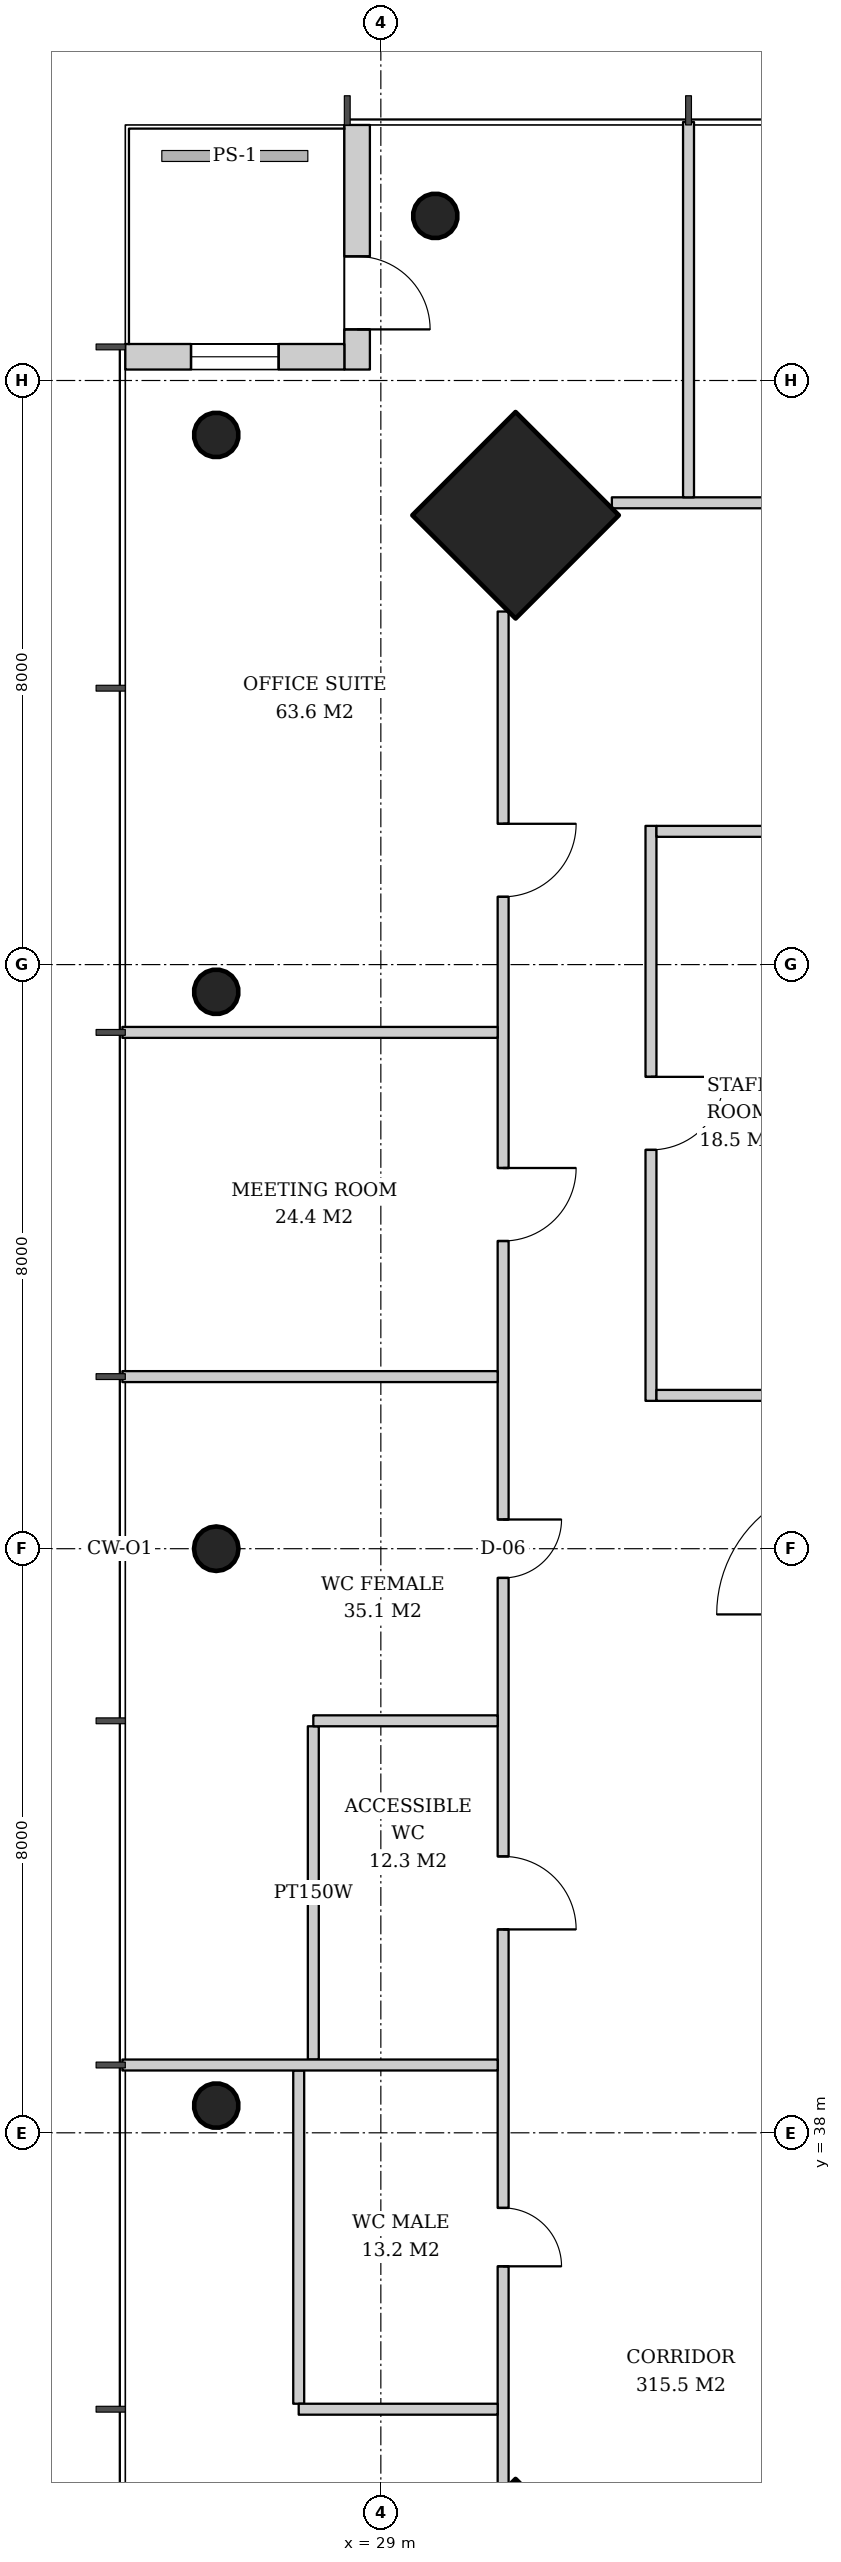
"""IFC4 building model, lengths in metres.
Left out: names, types, materials, properties, quantities, classifications, styles, units other than length and angle.
Written with IfcOpenShell. Run it as: python <this file> out.ifc"""

import sys

from ifc_helpers import new_model, si_unit, direction, frame, frame_2d, origin, origin_2d, place, context, subcontext, project, spatial, rectangle, hollow_circle, extrude, element, fill, save


model = new_model("IFC4")
c1 = context("Model", 3, precision=1e-05, world=origin(), true_north=direction((0.0, 1.0)))
c2 = subcontext(c1, "Body", "Model", "MODEL_VIEW")
j1 = project(units=[si_unit("LENGTHUNIT", "METRE"), si_unit("PLANEANGLEUNIT", "RADIAN")], contexts=[c1])
p1 = place(None, origin())
s1 = spatial("IfcSite", under=j1, at=p1, CompositionType="ELEMENT")
p2 = place(p1, origin())
s2 = spatial("IfcBuilding", under=s1, at=p2, CompositionType="ELEMENT")
p3 = place(p2, frame((0.0, 0.0, 199.6)))
s3 = spatial("IfcBuildingStorey", under=s2, at=p3, CompositionType="ELEMENT", Elevation=199.6)
p4 = place(p3, frame((30.807, 60.193, 0.0), z_axis=(0.031900153262, -0.031900153262, 0.998981861919), x_axis=(0.707106781187, 0.707106781187, 0.0)))
e1 = element("IfcColumn", 1, at=p4, inside=s3, PredefinedType="COLUMN", context=c2, shape_type="SweptSolid", body=[
    extrude(rectangle(XDim=2.0, YDim=2.0, at=origin_2d()), origin(), (0.0, 0.0, 1.0), 3.804),
])
p5 = place(p3, frame((29.707, 64.293, 0.0), z_axis=(0.031964207655, -0.031964207655, 0.998977766949), x_axis=(0.707106781187, 0.707106781187, 0.0)))
e2 = element("IfcColumn", 2, at=p5, inside=s3, PredefinedType="COLUMN", context=c2, shape_type="SweptSolid", body=[
    extrude(hollow_circle(Radius=0.305, WallThickness=0.025, at=origin_2d()), origin(), (0.0, 0.0, 1.0), 3.804),
])
p6 = place(p3, frame((30.807, 31.807, 0.0), z_axis=(0.031900153262, 0.031900153262, 0.998981861919), x_axis=(-0.707106781187, 0.707106781187, 0.0)))
e3 = element("IfcColumn", 3, at=p6, inside=s3, PredefinedType="COLUMN", context=c2, shape_type="SweptSolid", body=[
    extrude(rectangle(XDim=2.0, YDim=2.0, at=origin_2d()), origin(), (0.0, 0.0, 1.0), 3.804),
])
p7 = place(p3, frame((26.707, 61.293, 0.0), z_axis=(0.031964207655, -0.031964207655, 0.998977766949), x_axis=(0.707106781187, 0.707106781187, 0.0)))
e4 = element("IfcColumn", 4, at=p7, inside=s3, PredefinedType="COLUMN", context=c2, shape_type="SweptSolid", body=[
    extrude(hollow_circle(Radius=0.305, WallThickness=0.025, at=origin_2d()), origin(), (0.0, 0.0, 1.0), 3.804),
])
p8 = place(p3, frame((26.707, 53.646, 0.0), z_axis=(0.031976461511, -0.015988230756, 0.999360736865), x_axis=(0.4472135955, 0.894427191, 0.0)))
e5 = element("IfcColumn", 5, at=p8, inside=s3, PredefinedType="COLUMN", context=c2, shape_type="SweptSolid", body=[
    extrude(hollow_circle(Radius=0.305, WallThickness=0.025, at=origin_2d()), origin(), (0.0, 0.0, 1.0), 3.802),
])
p9 = place(p3, frame((26.707, 46.0, 0.0), z_axis=(0.031980549263, 0.0, 0.999488491414), x_axis=(0.0, 1.0, 0.0)))
e6 = element("IfcColumn", 6, at=p9, inside=s3, PredefinedType="COLUMN", context=c2, shape_type="SweptSolid", body=[
    extrude(hollow_circle(Radius=0.305, WallThickness=0.025, at=origin_2d()), origin(), (0.0, 0.0, 1.0), 3.802),
])
p10 = place(p3, frame((26.707, 38.354, 0.0), z_axis=(0.031976461511, 0.015988230756, 0.999360736865), x_axis=(-0.4472135955, 0.894427191, 0.0)))
e7 = element("IfcColumn", 7, at=p10, inside=s3, PredefinedType="COLUMN", context=c2, shape_type="SweptSolid", body=[
    extrude(hollow_circle(Radius=0.305, WallThickness=0.025, at=origin_2d()), origin(), (0.0, 0.0, 1.0), 3.802),
])
p11 = place(p3, frame((28.675, 65.5, 0.0), z_axis=(0.0, 0.0, 1.0), x_axis=(0.0, -1.0, 0.0)))
e8 = element("IfcWall", 8, at=p11, inside=s3, PredefinedType="SOLIDWALL", context=c2, shape_type="SweptSolid", body=[
    extrude(rectangle(XDim=3.35, YDim=0.35, at=frame_2d((1.675, 0.0))), origin(), (0.0, 0.0, 1.0), 3.62),
])
p12 = place(p11, frame((1.8, 0.0, 0.0)))
e9 = element("IfcOpeningElement", 9, at=p12, cuts=e8, PredefinedType="OPENING", context=c2, shape_type="SweptSolid", body=[
    extrude(rectangle(XDim=1.0, YDim=2.4, at=frame_2d((0.5, 1.2))), frame((0.0, 0.185, 0.0), z_axis=(0.0, -1.0, 0.0), x_axis=(1.0, 0.0, 0.0)), (0.0, 0.0, 1.0), 0.37),
])
p13 = place(p3, frame((28.5, 62.325, 0.0), z_axis=(0.0, 0.0, 1.0), x_axis=(-1.0, 0.0, 0.0)))
e10 = element("IfcWall", 10, at=p13, inside=s3, PredefinedType="SOLIDWALL", context=c2, shape_type="SweptSolid", body=[
    extrude(rectangle(XDim=3.0, YDim=0.35, at=frame_2d((1.5, 0.0))), origin(), (0.0, 0.0, 1.0), 3.62),
])
p14 = place(p13, frame((0.9, 0.0, 0.6)))
e11 = element("IfcOpeningElement", 11, at=p14, cuts=e10, PredefinedType="OPENING", context=c2, shape_type="SweptSolid", body=[
    extrude(rectangle(XDim=1.2, YDim=2.55, at=frame_2d((0.6, 1.275))), frame((0.0, 0.185, 0.0), z_axis=(0.0, -1.0, 0.0), x_axis=(1.0, 0.0, 0.0)), (0.0, 0.0, 1.0), 0.37),
])
p15 = place(p3, frame((32.7, 55.9, 0.0), z_axis=(0.0, 0.0, 1.0), x_axis=(0.0, -1.0, 0.0)))
e12 = element("IfcWall", 12, at=p15, inside=s3, PredefinedType="PARTITIONING", context=c2, shape_type="SweptSolid", body=[
    extrude(rectangle(XDim=7.875, YDim=0.15, at=frame_2d((3.938, 0.0))), origin(), (0.0, 0.0, 1.0), 2.867),
])
p16 = place(p15, frame((3.438, 0.0, 0.0)))
e13 = element("IfcOpeningElement", 13, at=p16, cuts=e12, PredefinedType="OPENING", context=c2, shape_type="SweptSolid", body=[
    extrude(rectangle(XDim=1.0, YDim=2.1, at=frame_2d((0.5, 1.05))), frame((0.0, 0.085, 0.0), z_axis=(0.0, -1.0, 0.0), x_axis=(1.0, 0.0, 0.0)), (0.0, 0.0, 1.0), 0.17),
])
p17 = place(p3, frame((35.1, 55.825, 0.0), z_axis=(0.0, 0.0, 1.0), x_axis=(-1.0, 0.0, 0.0)))
e14 = element("IfcWall", 14, at=p17, inside=s3, PredefinedType="PARTITIONING", context=c2, shape_type="SweptSolid", body=[
    extrude(rectangle(XDim=2.325, YDim=0.15, at=frame_2d((1.163, 0.0))), origin(), (0.0, 0.0, 1.0), 2.867),
])
p18 = place(p3, frame((35.1, 48.1, 0.0), z_axis=(0.0, 0.0, 1.0), x_axis=(-1.0, 0.0, 0.0)))
e15 = element("IfcWall", 15, at=p18, inside=s3, PredefinedType="PARTITIONING", context=c2, shape_type="SweptSolid", body=[
    extrude(rectangle(XDim=2.325, YDim=0.15, at=frame_2d((1.163, 0.0))), origin(), (0.0, 0.0, 1.0), 3.62),
])
p19 = place(p3, frame((57.836, 60.325, 0.0), z_axis=(0.0, 0.0, 1.0), x_axis=(-1.0, 0.0, 0.0)))
e16 = element("IfcWall", 16, at=p19, inside=s3, PredefinedType="PARTITIONING", context=c2, shape_type="SweptSolid", body=[
    extrude(rectangle(XDim=25.671, YDim=0.15, at=frame_2d((12.836, 0.0))), origin(), (0.0, 0.0, 1.0), 2.867),
])
p20 = place(p19, frame((2.907, 0.0, 0.0)))
e17 = element("IfcOpeningElement", 17, at=p20, cuts=e16, PredefinedType="OPENING", context=c2, shape_type="SweptSolid", body=[
    extrude(rectangle(XDim=1.0, YDim=2.1, at=frame_2d((0.5, 1.05))), frame((0.0, 0.085, 0.0), z_axis=(0.0, -1.0, 0.0), x_axis=(1.0, 0.0, 0.0)), (0.0, 0.0, 1.0), 0.17),
])
p21 = place(p19, frame((7.622, 0.0, 0.0)))
e18 = element("IfcOpeningElement", 18, at=p21, cuts=e16, PredefinedType="OPENING", context=c2, shape_type="SweptSolid", body=[
    extrude(rectangle(XDim=1.0, YDim=2.1, at=frame_2d((0.5, 1.05))), frame((0.0, 0.085, 0.0), z_axis=(0.0, -1.0, 0.0), x_axis=(1.0, 0.0, 0.0)), (0.0, 0.0, 1.0), 0.17),
])
p22 = place(p19, frame((12.336, 0.0, 0.0)))
e19 = element("IfcOpeningElement", 19, at=p22, cuts=e16, PredefinedType="OPENING", context=c2, shape_type="SweptSolid", body=[
    extrude(rectangle(XDim=1.0, YDim=2.1, at=frame_2d((0.5, 1.05))), frame((0.0, 0.085, 0.0), z_axis=(0.0, -1.0, 0.0), x_axis=(1.0, 0.0, 0.0)), (0.0, 0.0, 1.0), 0.17),
])
p23 = place(p19, frame((17.05, 0.0, 0.0)))
e20 = element("IfcOpeningElement", 20, at=p23, cuts=e16, PredefinedType="OPENING", context=c2, shape_type="SweptSolid", body=[
    extrude(rectangle(XDim=1.0, YDim=2.1, at=frame_2d((0.5, 1.05))), frame((0.0, 0.085, 0.0), z_axis=(0.0, -1.0, 0.0), x_axis=(1.0, 0.0, 0.0)), (0.0, 0.0, 1.0), 0.17),
])
p24 = place(p19, frame((21.764, 0.0, 0.0)))
e21 = element("IfcOpeningElement", 21, at=p24, cuts=e16, PredefinedType="OPENING", context=c2, shape_type="SweptSolid", body=[
    extrude(rectangle(XDim=1.0, YDim=2.1, at=frame_2d((0.5, 1.05))), frame((0.0, 0.085, 0.0), z_axis=(0.0, -1.0, 0.0), x_axis=(1.0, 0.0, 0.0)), (0.0, 0.0, 1.0), 0.17),
])
p25 = place(p3, frame((33.214, 60.4, 0.0), z_axis=(0.0, 0.0, 1.0), x_axis=(0.0, 1.0, 0.0)))
e22 = element("IfcWall", 22, at=p25, inside=s3, PredefinedType="PARTITIONING", context=c2, shape_type="SweptSolid", body=[
    extrude(rectangle(XDim=5.14, YDim=0.15, at=frame_2d((2.57, 0.0))), origin(), (0.0, 0.0, 1.0), 3.12),
])
for number, where, z_axis, x_axis in (
    (23, (28.075, 43.568, 0.0), (0.0, 0.0, 1.0), (0.0, -1.0, 0.0)),
    (24, (27.875, 38.854, 0.0), (0.0, 0.0, 1.0), (0.0, -1.0, 0.0)),
):
    element("IfcWall", number, at=place(p3, frame(where, z_axis=z_axis, x_axis=x_axis)), inside=s3, PredefinedType="PARTITIONING", context=c2, shape_type="SweptSolid", body=[
        extrude(rectangle(XDim=4.564, YDim=0.15, at=frame_2d((2.282, 0.0))), origin(), (0.0, 0.0, 1.0), 2.867),
    ])
p26 = place(p3, frame((30.675, 58.836, 0.0), z_axis=(0.0, 0.0, 1.0), x_axis=(0.0, -1.0, 0.0)))
e25 = element("IfcWall", 25, at=p26, inside=s3, PredefinedType="PARTITIONING", context=c2, shape_type="SweptSolid", body=[
    extrude(rectangle(XDim=25.671, YDim=0.15, at=frame_2d((12.836, 0.0))), origin(), (0.0, 0.0, 1.0), 2.867),
])
p27 = place(p26, frame((2.907, 0.0, 0.0)))
e26 = element("IfcOpeningElement", 26, at=p27, cuts=e25, PredefinedType="OPENING", context=c2, shape_type="SweptSolid", body=[
    extrude(rectangle(XDim=1.0, YDim=2.1, at=frame_2d((0.5, 1.05))), frame((0.0, 0.085, 0.0), z_axis=(0.0, -1.0, 0.0), x_axis=(1.0, 0.0, 0.0)), (0.0, 0.0, 1.0), 0.17),
])
p28 = place(p26, frame((7.622, 0.0, 0.0)))
e27 = element("IfcOpeningElement", 27, at=p28, cuts=e25, PredefinedType="OPENING", context=c2, shape_type="SweptSolid", body=[
    extrude(rectangle(XDim=1.0, YDim=2.1, at=frame_2d((0.5, 1.05))), frame((0.0, 0.085, 0.0), z_axis=(0.0, -1.0, 0.0), x_axis=(1.0, 0.0, 0.0)), (0.0, 0.0, 1.0), 0.17),
])
p29 = place(p26, frame((12.436, 0.0, 0.0)))
e28 = element("IfcOpeningElement", 28, at=p29, cuts=e25, PredefinedType="OPENING", context=c2, shape_type="SweptSolid", body=[
    extrude(rectangle(XDim=0.8, YDim=2.1, at=frame_2d((0.4, 1.05))), frame((0.0, 0.085, 0.0), z_axis=(0.0, -1.0, 0.0), x_axis=(1.0, 0.0, 0.0)), (0.0, 0.0, 1.0), 0.17),
])
p30 = place(p26, frame((17.05, 0.0, 0.0)))
e29 = element("IfcOpeningElement", 29, at=p30, cuts=e25, PredefinedType="OPENING", context=c2, shape_type="SweptSolid", body=[
    extrude(rectangle(XDim=1.0, YDim=2.1, at=frame_2d((0.5, 1.05))), frame((0.0, 0.085, 0.0), z_axis=(0.0, -1.0, 0.0), x_axis=(1.0, 0.0, 0.0)), (0.0, 0.0, 1.0), 0.17),
])
p31 = place(p26, frame((21.864, 0.0, 0.0)))
e30 = element("IfcOpeningElement", 30, at=p31, cuts=e25, PredefinedType="OPENING", context=c2, shape_type="SweptSolid", body=[
    extrude(rectangle(XDim=0.8, YDim=2.1, at=frame_2d((0.4, 1.05))), frame((0.0, 0.085, 0.0), z_axis=(0.0, -1.0, 0.0), x_axis=(1.0, 0.0, 0.0)), (0.0, 0.0, 1.0), 0.17),
])
for number, where, z_axis, x_axis in (
    (31, (30.6, 53.072, 0.0), (0.0, 0.0, 1.0), (-1.0, 0.0, 0.0)),
    (32, (30.6, 48.357, 0.0), (0.0, 0.0, 1.0), (-1.0, 0.0, 0.0)),
):
    element("IfcWall", number, at=place(p3, frame(where, z_axis=z_axis, x_axis=x_axis)), inside=s3, PredefinedType="PARTITIONING", context=c2, shape_type="SweptSolid", body=[
        extrude(rectangle(XDim=5.14, YDim=0.15, at=frame_2d((2.57, 0.0))), origin(), (0.0, 0.0, 1.0), 3.12),
    ])
p32 = place(p3, frame((30.6, 43.643, 0.0), z_axis=(0.0, 0.0, 1.0), x_axis=(-1.0, 0.0, 0.0)))
e33 = element("IfcWall", 33, at=p32, inside=s3, PredefinedType="PARTITIONING", context=c2, shape_type="SweptSolid", body=[
    extrude(rectangle(XDim=2.525, YDim=0.15, at=frame_2d((1.263, 0.0))), origin(), (0.0, 0.0, 1.0), 2.867),
])
p33 = place(p3, frame((30.6, 38.928, 0.0), z_axis=(0.0, 0.0, 1.0), x_axis=(-1.0, 0.0, 0.0)))
e34 = element("IfcWall", 34, at=p33, inside=s3, PredefinedType="PARTITIONING", context=c2, shape_type="SweptSolid", body=[
    extrude(rectangle(XDim=5.14, YDim=0.15, at=frame_2d((2.57, 0.0))), origin(), (0.0, 0.0, 1.0), 3.12),
])
p34 = place(p3, frame((30.6, 34.214, 0.0), z_axis=(0.0, 0.0, 1.0), x_axis=(-1.0, 0.0, 0.0)))
e35 = element("IfcWall", 35, at=p34, inside=s3, PredefinedType="PARTITIONING", context=c2, shape_type="SweptSolid", body=[
    extrude(rectangle(XDim=2.725, YDim=0.15, at=frame_2d((1.363, 0.0))), origin(), (0.0, 0.0, 1.0), 3.62),
])
p35 = place(p12, origin())
e36 = element("IfcDoor", 36, at=p35, inside=s3, OperationType="SINGLE_SWING_RIGHT", PredefinedType="DOOR", context=c2, shape_type="SweptSolid", body=[
    extrude(rectangle(XDim=1.0, YDim=2.4, at=frame_2d((0.5, 1.2))), frame((0.0, 0.025, 0.0), z_axis=(0.0, -1.0, 0.0), x_axis=(1.0, 0.0, 0.0)), (0.0, 0.0, 1.0), 0.05),
])
fill(e9, e36)
p36 = place(p14, origin())
e37 = element("IfcWindow", 37, at=p36, inside=s3, PartitioningType="SINGLE_PANEL", PredefinedType="WINDOW", context=c2, shape_type="SweptSolid", body=[
    extrude(rectangle(XDim=1.2, YDim=2.55, at=frame_2d((0.6, 1.275))), frame((0.0, 0.03, 0.0), z_axis=(0.0, -1.0, 0.0), x_axis=(1.0, 0.0, 0.0)), (0.0, 0.0, 1.0), 0.06),
])
fill(e11, e37)
p37 = place(p16, origin())
e38 = element("IfcDoor", 38, at=p37, inside=s3, OperationType="SINGLE_SWING_LEFT", PredefinedType="DOOR", context=c2, shape_type="SweptSolid", body=[
    extrude(rectangle(XDim=1.0, YDim=2.1, at=frame_2d((0.5, 1.05))), frame((0.0, 0.025, 0.0), z_axis=(0.0, -1.0, 0.0), x_axis=(1.0, 0.0, 0.0)), (0.0, 0.0, 1.0), 0.05),
])
fill(e13, e38)
p38 = place(p27, origin())
e39 = element("IfcDoor", 39, at=p38, inside=s3, OperationType="SINGLE_SWING_LEFT", PredefinedType="DOOR", context=c2, shape_type="SweptSolid", body=[
    extrude(rectangle(XDim=1.0, YDim=2.1, at=frame_2d((0.5, 1.05))), frame((0.0, 0.025, 0.0), z_axis=(0.0, -1.0, 0.0), x_axis=(1.0, 0.0, 0.0)), (0.0, 0.0, 1.0), 0.05),
])
fill(e26, e39)
p39 = place(p28, origin())
e40 = element("IfcDoor", 40, at=p39, inside=s3, OperationType="SINGLE_SWING_LEFT", PredefinedType="DOOR", context=c2, shape_type="SweptSolid", body=[
    extrude(rectangle(XDim=1.0, YDim=2.1, at=frame_2d((0.5, 1.05))), frame((0.0, 0.025, 0.0), z_axis=(0.0, -1.0, 0.0), x_axis=(1.0, 0.0, 0.0)), (0.0, 0.0, 1.0), 0.05),
])
fill(e27, e40)
p40 = place(p29, origin())
e41 = element("IfcDoor", 41, at=p40, inside=s3, OperationType="SINGLE_SWING_LEFT", PredefinedType="DOOR", context=c2, shape_type="SweptSolid", body=[
    extrude(rectangle(XDim=0.8, YDim=2.1, at=frame_2d((0.4, 1.05))), frame((0.0, 0.025, 0.0), z_axis=(0.0, -1.0, 0.0), x_axis=(1.0, 0.0, 0.0)), (0.0, 0.0, 1.0), 0.05),
])
fill(e28, e41)
p41 = place(p30, origin())
e42 = element("IfcDoor", 42, at=p41, inside=s3, OperationType="SINGLE_SWING_RIGHT", PredefinedType="DOOR", context=c2, shape_type="SweptSolid", body=[
    extrude(rectangle(XDim=1.0, YDim=2.1, at=frame_2d((0.5, 1.05))), frame((0.0, 0.025, 0.0), z_axis=(0.0, -1.0, 0.0), x_axis=(1.0, 0.0, 0.0)), (0.0, 0.0, 1.0), 0.05),
])
fill(e29, e42)
p42 = place(p31, origin())
e43 = element("IfcDoor", 43, at=p42, inside=s3, OperationType="SINGLE_SWING_RIGHT", PredefinedType="DOOR", context=c2, shape_type="SweptSolid", body=[
    extrude(rectangle(XDim=0.8, YDim=2.1, at=frame_2d((0.4, 1.05))), frame((0.0, 0.025, 0.0), z_axis=(0.0, -1.0, 0.0), x_axis=(1.0, 0.0, 0.0)), (0.0, 0.0, 1.0), 0.05),
])
fill(e30, e43)
save(model, sys.argv[1])
